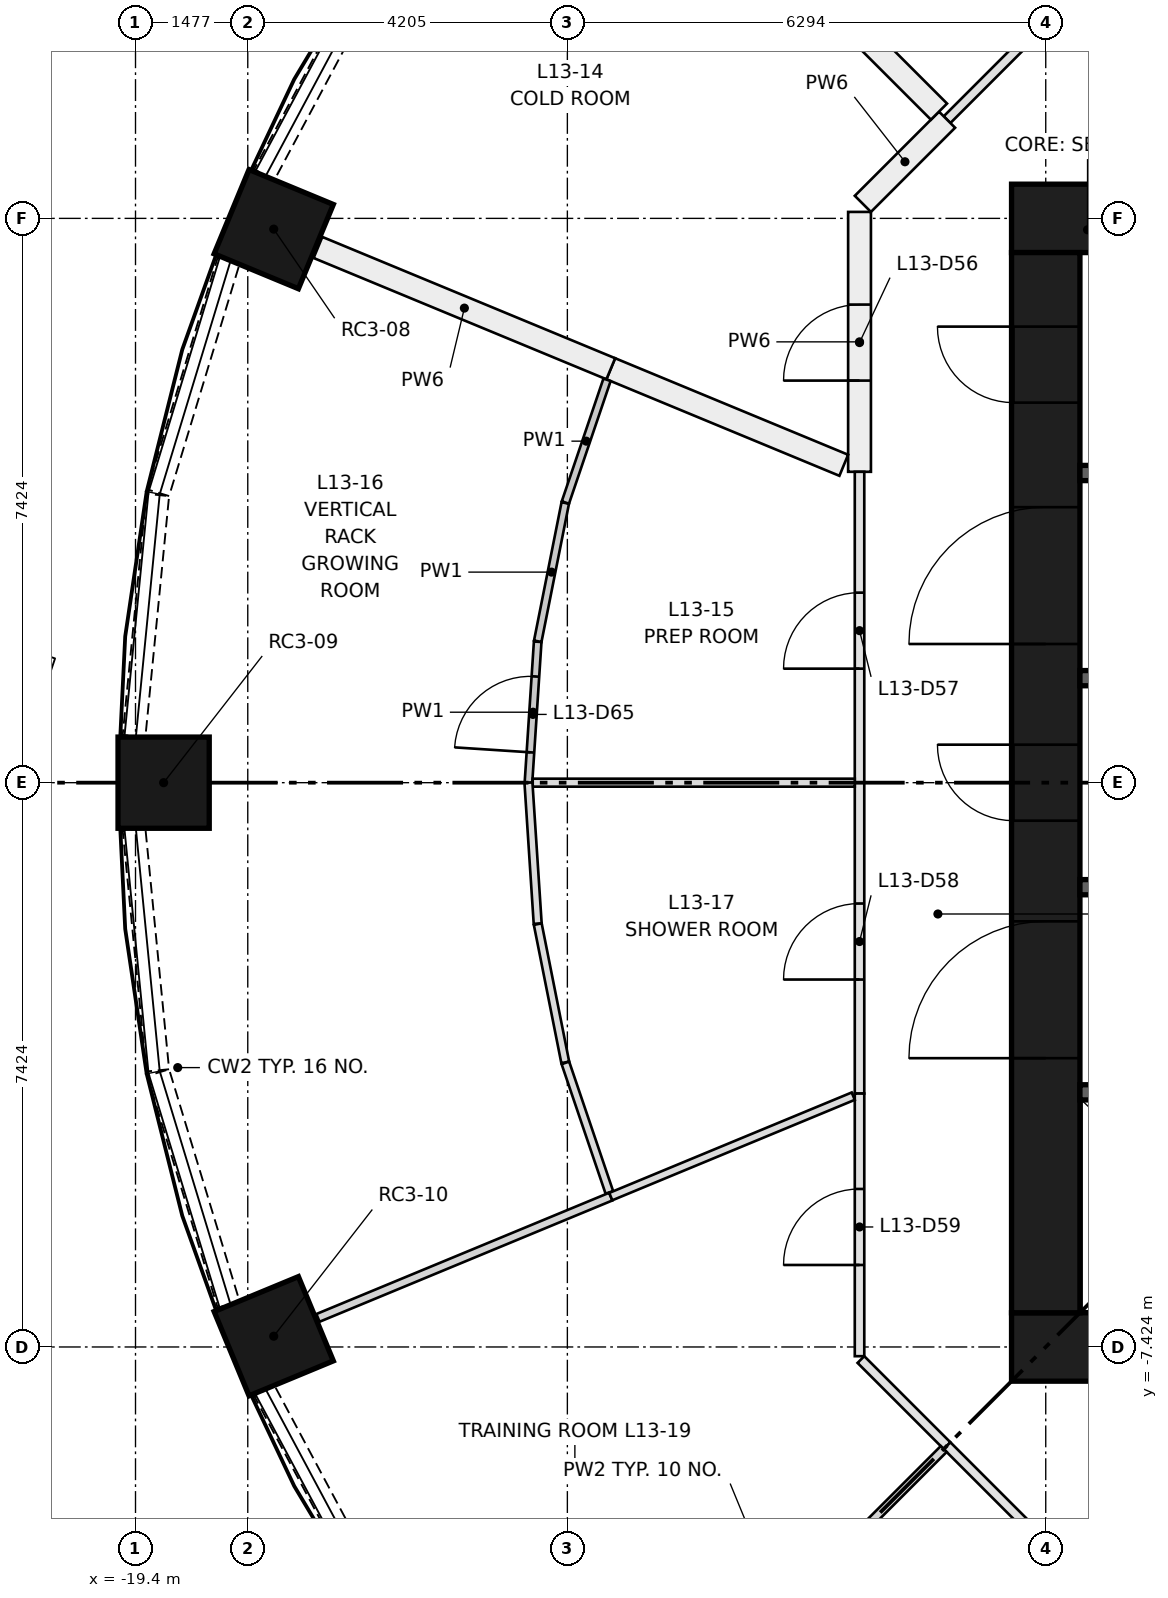
"""IFC4 building model, lengths in metres.
Left out: names, types, materials, properties, quantities, classifications, styles, units other than length and angle.
Written with IfcOpenShell. Run it as: python <this file> out.ifc"""

import sys

from ifc_helpers import new_model, si_unit, direction, frame, frame_2d, origin, origin_2d, place, context, subcontext, project, spatial, rectangle, extrude, element, fill, save


model = new_model("IFC4")
c1 = context("Model", 3, precision=1e-05, world=origin(), true_north=direction((0.0, 1.0)))
c2 = subcontext(c1, "Body", "Model", "MODEL_VIEW")
j1 = project(units=[si_unit("LENGTHUNIT", "METRE"), si_unit("PLANEANGLEUNIT", "RADIAN")], contexts=[c1])
p1 = place(None, origin())
s1 = spatial("IfcSite", under=j1, at=p1, CompositionType="ELEMENT")
p2 = place(p1, origin())
s2 = spatial("IfcBuilding", under=s1, at=p2, CompositionType="ELEMENT")
p3 = place(p2, frame((0.0, 0.0, 51.75)))
s3 = spatial("IfcBuildingStorey", under=s2, at=p3, CompositionType="ELEMENT", Elevation=51.75)
for number, where, z_axis, x_axis in (
    (1, (-17.582, 7.282, 0.0), (0.0, 0.0, 1.0), (-0.924, 0.383, 0.0)),
    (2, (-19.03, 0.0, 0.0), (0.0, 0.0, 1.0), (-1.0, 0.0, 0.0)),
    (3, (-17.582, -7.282, 0.0), (0.0, 0.0, 1.0), (-0.924, -0.383, 0.0)),
):
    element("IfcColumn", number, at=place(p3, frame(where, z_axis=z_axis, x_axis=x_axis)), inside=s3, PredefinedType="COLUMN", context=c2, shape_type="SweptSolid", body=[
        extrude(rectangle(XDim=1.2, YDim=1.2, at=origin_2d()), origin(), (0.0, 0.0, 1.0), 3.65),
    ])
for number, where, z_axis, x_axis in (
    (4, (-7.874, -7.424, 0.0), (0.0, 0.0, 1.0), (1.0, 0.0, 0.0)),
    (5, (-7.874, 7.424, 0.0), (0.0, 0.0, 1.0), (1.0, 0.0, 0.0)),
):
    element("IfcWall", number, at=place(p3, frame(where, z_axis=z_axis, x_axis=x_axis)), inside=s3, PredefinedType="SHEAR", context=c2, shape_type="SweptSolid", body=[
        extrude(rectangle(XDim=15.748, YDim=0.9, at=frame_2d((7.874, 0.0))), origin(), (0.0, 0.0, 1.0), 3.65),
    ])
p4 = place(p3, frame((-7.424, -6.974, 0.0), z_axis=(0.0, 0.0, 1.0), x_axis=(0.0, 1.0, 0.0)))
e6 = element("IfcWall", 6, at=p4, inside=s3, PredefinedType="SHEAR", context=c2, shape_type="SweptSolid", body=[
    extrude(rectangle(XDim=13.948, YDim=0.9, at=frame_2d((6.974, 0.0))), origin(), (0.0, 0.0, 1.0), 3.65),
])
p5 = place(p4, frame((6.474, 0.0, 0.0)))
e7 = element("IfcOpeningElement", 7, at=p5, cuts=e6, PredefinedType="OPENING", context=c2, shape_type="SweptSolid", body=[
    extrude(rectangle(XDim=1.0, YDim=2.1, at=frame_2d((0.5, 1.05))), frame((0.0, 0.46, 0.0), z_axis=(0.0, -1.0, 0.0), x_axis=(1.0, 0.0, 0.0)), (0.0, 0.0, 1.0), 0.92),
])
p6 = place(p4, frame((3.35, 0.0, 0.0)))
e8 = element("IfcOpeningElement", 8, at=p6, cuts=e6, PredefinedType="OPENING", context=c2, shape_type="SweptSolid", body=[
    extrude(rectangle(XDim=1.8, YDim=2.1, at=frame_2d((0.9, 1.05))), frame((0.0, 0.46, 0.0), z_axis=(0.0, -1.0, 0.0), x_axis=(1.0, 0.0, 0.0)), (0.0, 0.0, 1.0), 0.92),
])
p7 = place(p4, frame((8.799, 0.0, 0.0)))
e9 = element("IfcOpeningElement", 9, at=p7, cuts=e6, PredefinedType="OPENING", context=c2, shape_type="SweptSolid", body=[
    extrude(rectangle(XDim=1.8, YDim=2.1, at=frame_2d((0.9, 1.05))), frame((0.0, 0.46, 0.0), z_axis=(0.0, -1.0, 0.0), x_axis=(1.0, 0.0, 0.0)), (0.0, 0.0, 1.0), 0.92),
])
p8 = place(p4, frame((11.974, 0.0, 0.0)))
e10 = element("IfcOpeningElement", 10, at=p8, cuts=e6, PredefinedType="OPENING", context=c2, shape_type="SweptSolid", body=[
    extrude(rectangle(XDim=1.0, YDim=2.1, at=frame_2d((0.5, 1.05))), frame((0.0, 0.46, 0.0), z_axis=(0.0, -1.0, 0.0), x_axis=(1.0, 0.0, 0.0)), (0.0, 0.0, 1.0), 0.92),
])
p9 = place(p3, frame((-6.974, -4.074, 0.0), z_axis=(0.0, 0.0, 1.0), x_axis=(1.0, 0.0, 0.0)))
e11 = element("IfcWall", 11, at=p9, inside=s3, PredefinedType="SHEAR", context=c2, shape_type="SweptSolid", body=[
    extrude(rectangle(XDim=13.948, YDim=0.2, at=frame_2d((6.974, 0.0))), origin(), (0.0, 0.0, 1.0), 3.3),
])
p10 = place(p9, frame((0.918, 0.0, 0.0)))
e12 = element("IfcOpeningElement", 12, at=p10, cuts=e11, PredefinedType="OPENING", context=c2, shape_type="SweptSolid", body=[
    extrude(rectangle(XDim=1.1, YDim=2.1, at=frame_2d((0.55, 1.05))), frame((0.0, 0.11, 0.0), z_axis=(0.0, -1.0, 0.0), x_axis=(1.0, 0.0, 0.0)), (0.0, 0.0, 1.0), 0.22),
])
p11 = place(p9, frame((4.055, 0.0, 0.0)))
e13 = element("IfcOpeningElement", 13, at=p11, cuts=e11, PredefinedType="OPENING", context=c2, shape_type="SweptSolid", body=[
    extrude(rectangle(XDim=1.1, YDim=2.1, at=frame_2d((0.55, 1.05))), frame((0.0, 0.11, 0.0), z_axis=(0.0, -1.0, 0.0), x_axis=(1.0, 0.0, 0.0)), (0.0, 0.0, 1.0), 0.22),
])
p12 = place(p9, frame((6.658, 0.0, 0.0)))
e14 = element("IfcOpeningElement", 14, at=p12, cuts=e11, PredefinedType="OPENING", context=c2, shape_type="SweptSolid", body=[
    extrude(rectangle(XDim=1.0, YDim=2.1, at=frame_2d((0.5, 1.05))), frame((0.0, 0.11, 0.0), z_axis=(0.0, -1.0, 0.0), x_axis=(1.0, 0.0, 0.0)), (0.0, 0.0, 1.0), 0.22),
])
p13 = place(p9, frame((8.627, 0.0, 0.0)))
e15 = element("IfcOpeningElement", 15, at=p13, cuts=e11, PredefinedType="OPENING", context=c2, shape_type="SweptSolid", body=[
    extrude(rectangle(XDim=1.0, YDim=2.1, at=frame_2d((0.5, 1.05))), frame((0.0, 0.11, 0.0), z_axis=(0.0, -1.0, 0.0), x_axis=(1.0, 0.0, 0.0)), (0.0, 0.0, 1.0), 0.22),
])
p14 = place(p9, frame((10.595, 0.0, 0.0)))
e16 = element("IfcOpeningElement", 16, at=p14, cuts=e11, PredefinedType="OPENING", context=c2, shape_type="SweptSolid", body=[
    extrude(rectangle(XDim=1.0, YDim=2.1, at=frame_2d((0.5, 1.05))), frame((0.0, 0.11, 0.0), z_axis=(0.0, -1.0, 0.0), x_axis=(1.0, 0.0, 0.0)), (0.0, 0.0, 1.0), 0.22),
])
p15 = place(p9, frame((12.564, 0.0, 0.0)))
e17 = element("IfcOpeningElement", 17, at=p15, cuts=e11, PredefinedType="OPENING", context=c2, shape_type="SweptSolid", body=[
    extrude(rectangle(XDim=1.0, YDim=2.1, at=frame_2d((0.5, 1.05))), frame((0.0, 0.11, 0.0), z_axis=(0.0, -1.0, 0.0), x_axis=(1.0, 0.0, 0.0)), (0.0, 0.0, 1.0), 0.22),
])
p16 = place(p3, frame((-6.974, 4.074, 0.0), z_axis=(0.0, 0.0, 1.0), x_axis=(1.0, 0.0, 0.0)))
e18 = element("IfcWall", 18, at=p16, inside=s3, PredefinedType="SHEAR", context=c2, shape_type="SweptSolid", body=[
    extrude(rectangle(XDim=6.974, YDim=0.2, at=frame_2d((3.487, 0.0))), origin(), (0.0, 0.0, 1.0), 3.3),
])
for number, where, z_axis, x_axis in (
    (19, (-6.974, -1.375, 0.0), (0.0, 0.0, 1.0), (1.0, 0.0, 0.0)),
    (20, (-6.974, 1.375, 0.0), (0.0, 0.0, 1.0), (1.0, 0.0, 0.0)),
):
    element("IfcWall", number, at=place(p3, frame(where, z_axis=z_axis, x_axis=x_axis)), inside=s3, PredefinedType="SHEAR", context=c2, shape_type="SweptSolid", body=[
        extrude(rectangle(XDim=2.6, YDim=0.2, at=frame_2d((1.3, 0.0))), origin(), (0.0, 0.0, 1.0), 3.3),
    ])
p17 = place(p3, frame((-16.204, 10.809, 0.0), z_axis=(0.0, 0.0, 1.0), x_axis=(-0.471260138764, -0.881994263934, 0.0)))
e21 = element("IfcWall", 21, at=p17, inside=s3, PredefinedType="SOLIDWALL", context=c2, shape_type="SweptSolid", body=[
    extrude(rectangle(XDim=3.187, YDim=0.3, at=frame_2d((1.593, 0.0))), origin(), (0.0, 0.0, 1.0), 0.9),
])
p18 = place(p3, frame((-18.175, 6.865, 0.0), z_axis=(0.0, 0.0, 1.0), x_axis=(-0.290585541792, -0.956849017819, 0.0)))
e22 = element("IfcWall", 22, at=p18, inside=s3, PredefinedType="SOLIDWALL", context=c2, shape_type="SweptSolid", body=[
    extrude(rectangle(XDim=3.188, YDim=0.3, at=frame_2d((1.594, 0.0))), origin(), (0.0, 0.0, 1.0), 0.9),
])
for number, where, z_axis, x_axis in (
    (23, (-19.107, 3.785, 0.0), (0.0, 0.0, 1.0), (-0.098, -0.995, 0.0)),
    (24, (-19.419, -0.613, 0.0), (0.0, 0.0, 1.0), (0.098, -0.995, 0.0)),
):
    element("IfcWall", number, at=place(p3, frame(where, z_axis=z_axis, x_axis=x_axis)), inside=s3, PredefinedType="SOLIDWALL", context=c2, shape_type="SweptSolid", body=[
        extrude(rectangle(XDim=3.188, YDim=0.3, at=frame_2d((1.594, 0.0))), origin(), (0.0, 0.0, 1.0), 0.9),
    ])
p19 = place(p3, frame((-19.102, -3.814, 0.0), z_axis=(0.0, 0.0, 1.0), x_axis=(0.290585541792, -0.956849017819, 0.0)))
e25 = element("IfcWall", 25, at=p19, inside=s3, PredefinedType="SOLIDWALL", context=c2, shape_type="SweptSolid", body=[
    extrude(rectangle(XDim=3.188, YDim=0.3, at=frame_2d((1.594, 0.0))), origin(), (0.0, 0.0, 1.0), 0.9),
])
p20 = place(p3, frame((-17.706, -7.998, 0.0), z_axis=(0.0, 0.0, 1.0), x_axis=(0.471260138764, -0.881994263934, 0.0)))
e26 = element("IfcWall", 26, at=p20, inside=s3, PredefinedType="SOLIDWALL", context=c2, shape_type="SweptSolid", body=[
    extrude(rectangle(XDim=3.187, YDim=0.3, at=frame_2d((1.593, 0.0))), origin(), (0.0, 0.0, 1.0), 0.9),
])
p21 = place(p3, frame((-8.722, 8.722, 0.0), z_axis=(0.0, 0.0, 1.0), x_axis=(0.707030604857, 0.70718294931, 0.0)))
e27 = element("IfcWall", 27, at=p21, inside=s3, PredefinedType="PARTITIONING", context=c2, shape_type="SweptSolid", body=[
    extrude(rectangle(XDim=1.603, YDim=0.125, at=frame_2d((0.801, 0.0))), origin(), (0.0, 0.0, 1.0), 3.3),
])
p22 = place(p3, frame((-9.874, 4.09, 0.0), z_axis=(0.0, 0.0, 1.0), x_axis=(0.0, 1.0, 0.0)))
e28 = element("IfcWall", 28, at=p22, inside=s3, PredefinedType="PARTITIONING", context=c2, shape_type="SweptSolid", body=[
    extrude(rectangle(XDim=3.419, YDim=0.3, at=frame_2d((1.709, 0.0))), origin(), (0.0, 0.0, 1.0), 3.3),
])
p23 = place(p22, frame((1.2, 0.0, 0.0)))
e29 = element("IfcOpeningElement", 29, at=p23, cuts=e28, PredefinedType="OPENING", context=c2, shape_type="SweptSolid", body=[
    extrude(rectangle(XDim=1.0, YDim=2.1, at=frame_2d((0.5, 1.05))), frame((0.0, 0.16, 0.0), z_axis=(0.0, -1.0, 0.0), x_axis=(1.0, 0.0, 0.0)), (0.0, 0.0, 1.0), 0.32),
])
p24 = place(p3, frame((-9.83, 7.615, 0.0), z_axis=(0.0, 0.0, 1.0), x_axis=(0.70718471217, 0.707028841614, 0.0)))
e30 = element("IfcWall", 30, at=p24, inside=s3, PredefinedType="PARTITIONING", context=c2, shape_type="SweptSolid", body=[
    extrude(rectangle(XDim=1.566, YDim=0.3, at=frame_2d((0.783, 0.0))), origin(), (0.0, 0.0, 1.0), 3.3),
])
p25 = place(p3, frame((-9.874, 0.0, 0.0), z_axis=(0.0, 0.0, 1.0), x_axis=(0.0, 1.0, 0.0)))
e31 = element("IfcWall", 31, at=p25, inside=s3, PredefinedType="PARTITIONING", context=c2, shape_type="SweptSolid", body=[
    extrude(rectangle(XDim=4.09, YDim=0.125, at=frame_2d((2.045, 0.0))), origin(), (0.0, 0.0, 1.0), 3.3),
])
p26 = place(p25, frame((1.5, 0.0, 0.0)))
e32 = element("IfcOpeningElement", 32, at=p26, cuts=e31, PredefinedType="OPENING", context=c2, shape_type="SweptSolid", body=[
    extrude(rectangle(XDim=1.0, YDim=2.1, at=frame_2d((0.5, 1.05))), frame((0.0, 0.073, 0.0), z_axis=(0.0, -1.0, 0.0), x_axis=(1.0, 0.0, 0.0)), (0.0, 0.0, 1.0), 0.145),
])
p27 = place(p3, frame((-9.874, -4.09, 0.0), z_axis=(0.0, 0.0, 1.0), x_axis=(0.0, 1.0, 0.0)))
e33 = element("IfcWall", 33, at=p27, inside=s3, PredefinedType="PARTITIONING", context=c2, shape_type="SweptSolid", body=[
    extrude(rectangle(XDim=4.09, YDim=0.125, at=frame_2d((2.045, 0.0))), origin(), (0.0, 0.0, 1.0), 3.3),
])
p28 = place(p27, frame((1.5, 0.0, 0.0)))
e34 = element("IfcOpeningElement", 34, at=p28, cuts=e33, PredefinedType="OPENING", context=c2, shape_type="SweptSolid", body=[
    extrude(rectangle(XDim=1.0, YDim=2.1, at=frame_2d((0.5, 1.05))), frame((0.0, 0.073, 0.0), z_axis=(0.0, -1.0, 0.0), x_axis=(1.0, 0.0, 0.0)), (0.0, 0.0, 1.0), 0.145),
])
p29 = place(p3, frame((-9.874, -7.545, 0.0), z_axis=(0.0, 0.0, 1.0), x_axis=(0.0, 1.0, 0.0)))
e35 = element("IfcWall", 35, at=p29, inside=s3, PredefinedType="PARTITIONING", context=c2, shape_type="SweptSolid", body=[
    extrude(rectangle(XDim=3.455, YDim=0.125, at=frame_2d((1.728, 0.0))), origin(), (0.0, 0.0, 1.0), 3.3),
])
p30 = place(p29, frame((1.2, 0.0, 0.0)))
e36 = element("IfcOpeningElement", 36, at=p30, cuts=e35, PredefinedType="OPENING", context=c2, shape_type="SweptSolid", body=[
    extrude(rectangle(XDim=1.0, YDim=2.1, at=frame_2d((0.5, 1.05))), frame((0.0, 0.073, 0.0), z_axis=(0.0, -1.0, 0.0), x_axis=(1.0, 0.0, 0.0)), (0.0, 0.0, 1.0), 0.145),
])
for number, where, z_axis, x_axis in (
    (37, (-8.722, -8.722, 0.0), (0.0, 0.0, 1.0), (-0.707, 0.707, 0.0)),
    (38, (-7.589, -9.856, 0.0), (0.0, 0.0, 1.0), (-0.707, 0.707, 0.0)),
):
    element("IfcWall", number, at=place(p3, frame(where, z_axis=z_axis, x_axis=x_axis)), inside=s3, PredefinedType="PARTITIONING", context=c2, shape_type="SweptSolid", body=[
        extrude(rectangle(XDim=1.603, YDim=0.125, at=frame_2d((0.801, 0.0))), origin(), (0.0, 0.0, 1.0), 3.3),
    ])
p31 = place(p3, frame((-8.829, 8.829, 0.0), z_axis=(0.0, 0.0, 1.0), x_axis=(-0.707106781187, 0.707106781187, 0.0)))
e39 = element("IfcWall", 39, at=p31, inside=s3, PredefinedType="PARTITIONING", context=c2, shape_type="SweptSolid", body=[
    extrude(rectangle(XDim=5.914, YDim=0.3, at=frame_2d((2.957, 0.0))), origin(), (0.0, 0.0, 1.0), 3.3),
])
p32 = place(p3, frame((-10.081, 4.176, 0.0), z_axis=(0.0, 0.0, 1.0), x_axis=(-0.923876033225, 0.382691880281, 0.0)))
e40 = element("IfcWall", 40, at=p32, inside=s3, PredefinedType="PARTITIONING", context=c2, shape_type="SweptSolid", body=[
    extrude(rectangle(XDim=3.318, YDim=0.3, at=frame_2d((1.659, 0.0))), origin(), (0.0, 0.0, 1.0), 3.3),
])
p33 = place(p3, frame((-13.147, 5.446, 0.0), z_axis=(0.0, 0.0, 1.0), x_axis=(-0.923873410436, 0.382698212028, 0.0)))
e41 = element("IfcWall", 41, at=p33, inside=s3, PredefinedType="PARTITIONING", context=c2, shape_type="SweptSolid", body=[
    extrude(rectangle(XDim=4.17, YDim=0.3, at=frame_2d((2.085, 0.0))), origin(), (0.0, 0.0, 1.0), 3.3),
])
p34 = place(p3, frame((-14.23, 0.0, 0.0), z_axis=(0.0, 0.0, 1.0), x_axis=(0.065437532333, 0.997856667745, 0.0)))
e42 = element("IfcWall", 42, at=p34, inside=s3, PredefinedType="PARTITIONING", context=c2, shape_type="SweptSolid", body=[
    extrude(rectangle(XDim=1.858, YDim=0.1, at=frame_2d((0.929, 0.0))), origin(), (0.0, 0.0, 1.0), 3.3),
])
p35 = place(p34, frame((0.4, 0.0, 0.0)))
e43 = element("IfcOpeningElement", 43, at=p35, cuts=e42, PredefinedType="OPENING", context=c2, shape_type="SweptSolid", body=[
    extrude(rectangle(XDim=1.0, YDim=2.1, at=frame_2d((0.5, 1.05))), frame((0.0, 0.06, 0.0), z_axis=(0.0, -1.0, 0.0), x_axis=(1.0, 0.0, 0.0)), (0.0, 0.0, 1.0), 0.12),
])
p36 = place(p3, frame((-14.108, 1.861, 0.0), z_axis=(0.0, 0.0, 1.0), x_axis=(0.195204777565, 0.980762506836, 0.0)))
e44 = element("IfcWall", 44, at=p36, inside=s3, PredefinedType="PARTITIONING", context=c2, shape_type="SweptSolid", body=[
    extrude(rectangle(XDim=1.855, YDim=0.1, at=frame_2d((0.927, 0.0))), origin(), (0.0, 0.0, 1.0), 3.3),
])
p37 = place(p3, frame((-13.744, 3.686, 0.0), z_axis=(0.0, 0.0, 1.0), x_axis=(0.321250473512, 0.946994262532, 0.0)))
e45 = element("IfcWall", 45, at=p37, inside=s3, PredefinedType="PARTITIONING", context=c2, shape_type="SweptSolid", body=[
    extrude(rectangle(XDim=1.705, YDim=0.1, at=frame_2d((0.852, 0.0))), origin(), (0.0, 0.0, 1.0), 3.3),
])
p38 = place(p3, frame((-9.937, 0.0, 0.0), z_axis=(0.0, 0.0, 1.0), x_axis=(-1.0, 0.0, 0.0)))
e46 = element("IfcWall", 46, at=p38, inside=s3, PredefinedType="PARTITIONING", context=c2, shape_type="SweptSolid", body=[
    extrude(rectangle(XDim=4.237, YDim=0.105, at=frame_2d((2.119, 0.0))), origin(), (0.0, 0.0, 1.0), 3.3),
])
p39 = place(p3, frame((-14.23, 0.0, 0.0), z_axis=(0.0, 0.0, 1.0), x_axis=(0.065437532333, -0.997856667745, 0.0)))
e47 = element("IfcWall", 47, at=p39, inside=s3, PredefinedType="PARTITIONING", context=c2, shape_type="SweptSolid", body=[
    extrude(rectangle(XDim=1.858, YDim=0.105, at=frame_2d((0.929, 0.0))), origin(), (0.0, 0.0, 1.0), 3.3),
])
p40 = place(p3, frame((-14.108, -1.861, 0.0), z_axis=(0.0, 0.0, 1.0), x_axis=(0.195103348377, -0.980782689209, 0.0)))
e48 = element("IfcWall", 48, at=p40, inside=s3, PredefinedType="PARTITIONING", context=c2, shape_type="SweptSolid", body=[
    extrude(rectangle(XDim=1.854, YDim=0.105, at=frame_2d((0.927, 0.0))), origin(), (0.0, 0.0, 1.0), 3.3),
])
p41 = place(p3, frame((-13.744, -3.686, 0.0), z_axis=(0.0, 0.0, 1.0), x_axis=(0.321433227273, -0.946932246998, 0.0)))
e49 = element("IfcWall", 49, at=p41, inside=s3, PredefinedType="PARTITIONING", context=c2, shape_type="SweptSolid", body=[
    extrude(rectangle(XDim=1.799, YDim=0.105, at=frame_2d((0.9, 0.0))), origin(), (0.0, 0.0, 1.0), 3.3),
])
p42 = place(p3, frame((-13.147, -5.446, 0.0), z_axis=(0.0, 0.0, 1.0), x_axis=(-0.923873410436, -0.382698212028, 0.0)))
e50 = element("IfcWall", 50, at=p42, inside=s3, PredefinedType="PARTITIONING", context=c2, shape_type="SweptSolid", body=[
    extrude(rectangle(XDim=4.17, YDim=0.11, at=frame_2d((2.085, 0.0))), origin(), (0.0, 0.0, 1.0), 3.3),
])
p43 = place(p3, frame((-9.957, -4.124, 0.0), z_axis=(0.0, 0.0, 1.0), x_axis=(-0.923867748948, -0.382711879165, 0.0)))
e51 = element("IfcWall", 51, at=p43, inside=s3, PredefinedType="PARTITIONING", context=c2, shape_type="SweptSolid", body=[
    extrude(rectangle(XDim=3.453, YDim=0.105, at=frame_2d((1.727, 0.0))), origin(), (0.0, 0.0, 1.0), 3.3),
])
p44 = place(p3, frame((-13.011, -13.011, 0.0), z_axis=(0.0, 0.0, 1.0), x_axis=(0.707106781187, 0.707106781187, 0.0)))
e52 = element("IfcWall", 52, at=p44, inside=s3, PredefinedType="PARTITIONING", context=c2, shape_type="SweptSolid", body=[
    extrude(rectangle(XDim=6.002, YDim=0.11, at=frame_2d((3.001, 0.0))), origin(), (0.0, 0.0, 1.0), 3.3),
])
p45 = place(p5, origin())
e53 = element("IfcDoor", 53, at=p45, inside=s3, OperationType="SINGLE_SWING_RIGHT", PredefinedType="DOOR", context=c2, shape_type="SweptSolid", body=[
    extrude(rectangle(XDim=1.0, YDim=2.1, at=frame_2d((0.5, 1.05))), frame((0.0, 0.45, 0.0), z_axis=(0.0, -1.0, 0.0), x_axis=(1.0, 0.0, 0.0)), (0.0, 0.0, 1.0), 0.05),
])
fill(e7, e53)
p46 = place(p6, origin())
e54 = element("IfcDoor", 54, at=p46, inside=s3, OperationType="DOUBLE_DOOR_SINGLE_SWING", PredefinedType="DOOR", context=c2, shape_type="SweptSolid", body=[
    extrude(rectangle(XDim=1.8, YDim=2.1, at=frame_2d((0.9, 1.05))), frame((0.0, 0.025, 0.0), z_axis=(0.0, -1.0, 0.0), x_axis=(1.0, 0.0, 0.0)), (0.0, 0.0, 1.0), 0.05),
])
fill(e8, e54)
p47 = place(p7, origin())
e55 = element("IfcDoor", 55, at=p47, inside=s3, OperationType="DOUBLE_DOOR_SINGLE_SWING", PredefinedType="DOOR", context=c2, shape_type="SweptSolid", body=[
    extrude(rectangle(XDim=1.8, YDim=2.1, at=frame_2d((0.9, 1.05))), frame((0.0, 0.025, 0.0), z_axis=(0.0, -1.0, 0.0), x_axis=(1.0, 0.0, 0.0)), (0.0, 0.0, 1.0), 0.05),
])
fill(e9, e55)
p48 = place(p8, origin())
e56 = element("IfcDoor", 56, at=p48, inside=s3, OperationType="SINGLE_SWING_RIGHT", PredefinedType="DOOR", context=c2, shape_type="SweptSolid", body=[
    extrude(rectangle(XDim=1.0, YDim=2.1, at=frame_2d((0.5, 1.05))), frame((0.0, 0.45, 0.0), z_axis=(0.0, -1.0, 0.0), x_axis=(1.0, 0.0, 0.0)), (0.0, 0.0, 1.0), 0.05),
])
fill(e10, e56)
p49 = place(p23, origin())
e57 = element("IfcDoor", 57, at=p49, inside=s3, OperationType="SINGLE_SWING_LEFT", PredefinedType="DOOR", context=c2, shape_type="SweptSolid", body=[
    extrude(rectangle(XDim=1.0, YDim=2.1, at=frame_2d((0.5, 1.05))), frame((0.0, 0.025, 0.0), z_axis=(0.0, -1.0, 0.0), x_axis=(1.0, 0.0, 0.0)), (0.0, 0.0, 1.0), 0.05),
])
fill(e29, e57)
p50 = place(p26, origin())
e58 = element("IfcDoor", 58, at=p50, inside=s3, OperationType="SINGLE_SWING_LEFT", PredefinedType="DOOR", context=c2, shape_type="SweptSolid", body=[
    extrude(rectangle(XDim=1.0, YDim=2.1, at=frame_2d((0.5, 1.05))), frame((0.0, 0.025, 0.0), z_axis=(0.0, -1.0, 0.0), x_axis=(1.0, 0.0, 0.0)), (0.0, 0.0, 1.0), 0.05),
])
fill(e32, e58)
p51 = place(p28, origin())
e59 = element("IfcDoor", 59, at=p51, inside=s3, OperationType="SINGLE_SWING_LEFT", PredefinedType="DOOR", context=c2, shape_type="SweptSolid", body=[
    extrude(rectangle(XDim=1.0, YDim=2.1, at=frame_2d((0.5, 1.05))), frame((0.0, 0.025, 0.0), z_axis=(0.0, -1.0, 0.0), x_axis=(1.0, 0.0, 0.0)), (0.0, 0.0, 1.0), 0.05),
])
fill(e34, e59)
p52 = place(p30, origin())
e60 = element("IfcDoor", 60, at=p52, inside=s3, OperationType="SINGLE_SWING_LEFT", PredefinedType="DOOR", context=c2, shape_type="SweptSolid", body=[
    extrude(rectangle(XDim=1.0, YDim=2.1, at=frame_2d((0.5, 1.05))), frame((0.0, 0.025, 0.0), z_axis=(0.0, -1.0, 0.0), x_axis=(1.0, 0.0, 0.0)), (0.0, 0.0, 1.0), 0.05),
])
fill(e36, e60)
p53 = place(p35, origin())
e61 = element("IfcDoor", 61, at=p53, inside=s3, OperationType="SINGLE_SWING_LEFT", PredefinedType="DOOR", context=c2, shape_type="SweptSolid", body=[
    extrude(rectangle(XDim=1.0, YDim=2.1, at=frame_2d((0.5, 1.05))), frame((0.0, 0.025, 0.0), z_axis=(0.0, -1.0, 0.0), x_axis=(1.0, 0.0, 0.0)), (0.0, 0.0, 1.0), 0.05),
])
fill(e43, e61)
save(model, sys.argv[1])
